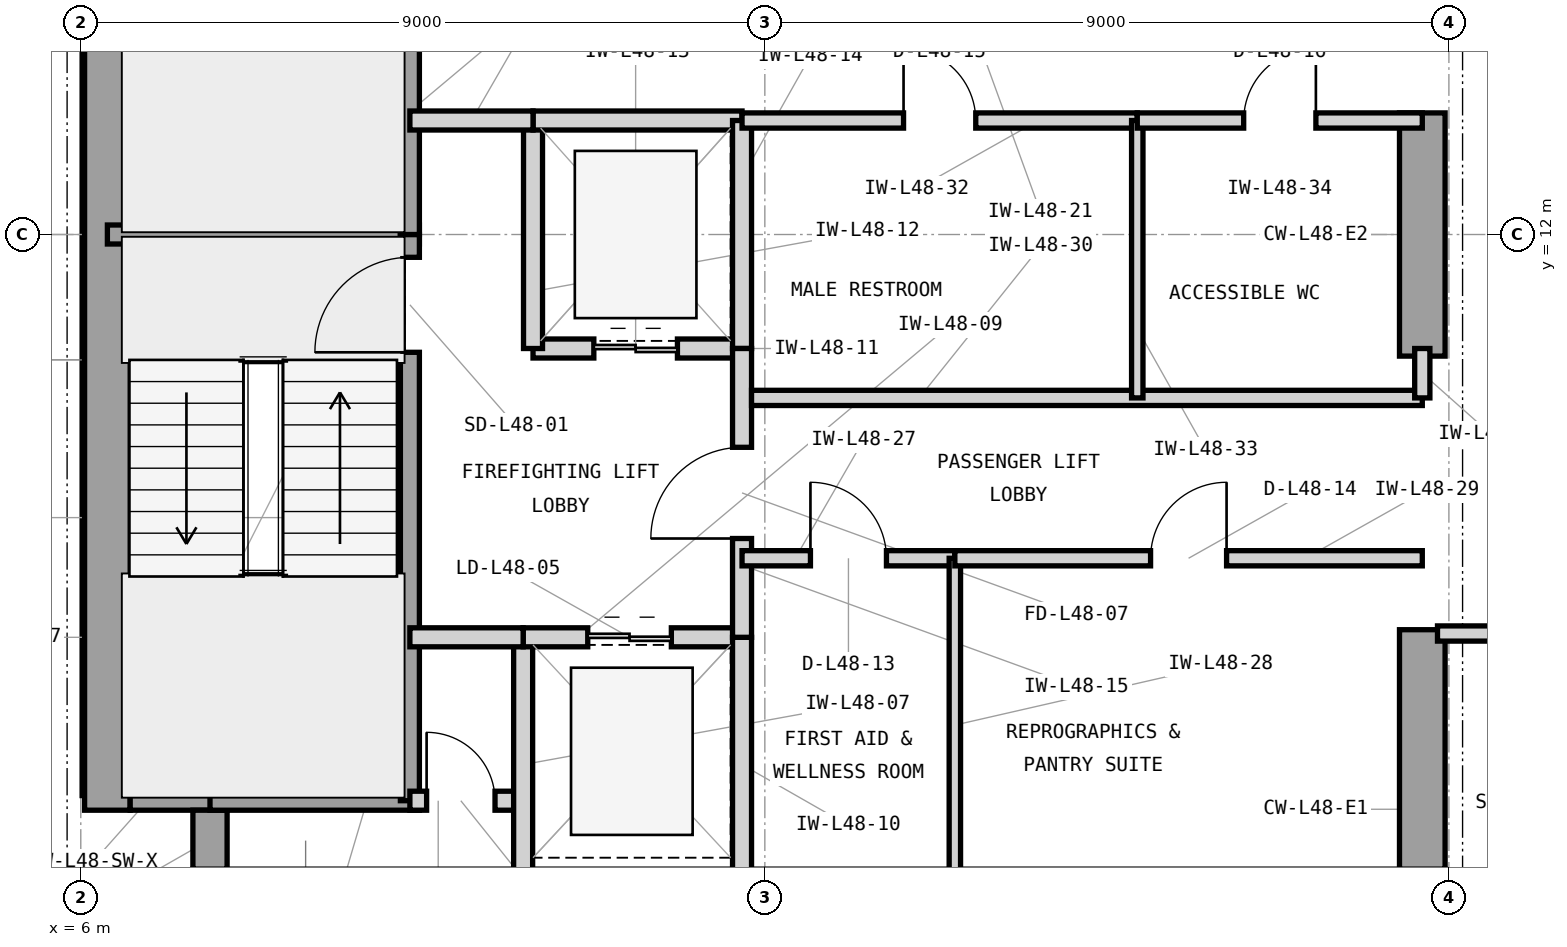
"""IFC4 building model, lengths in metres.
Left out: names, types, materials, properties, quantities, classifications, styles, units other than length and angle.
Written with IfcOpenShell. Run it as: python <this file> out.ifc"""

import sys

from ifc_helpers import new_model, si_unit, direction, frame, frame_2d, origin, place, context, subcontext, project, spatial, rectangle, extrude, element, fill, save


model = new_model("IFC4")
c1 = context("Model", 3, precision=1e-05, world=origin(), true_north=direction((0.0, 1.0)))
c2 = subcontext(c1, "Body", "Model", "MODEL_VIEW")
j1 = project(units=[si_unit("LENGTHUNIT", "METRE"), si_unit("PLANEANGLEUNIT", "RADIAN")], contexts=[c1])
p1 = place(None, origin())
s1 = spatial("IfcSite", under=j1, at=p1, CompositionType="ELEMENT")
p2 = place(p1, origin())
s2 = spatial("IfcBuilding", under=s1, at=p2, CompositionType="ELEMENT")
p3 = place(p2, frame((0.0, 0.0, 199.5)))
s3 = spatial("IfcBuildingStorey", under=s2, at=p3, CompositionType="ELEMENT", Elevation=199.5)
p4 = place(p3, frame((6.35, 4.425, 0.0), z_axis=(0.0, 0.0, 1.0), x_axis=(0.0, 1.0, 0.0)))
e1 = element("IfcWall", 1, at=p4, inside=s3, PredefinedType="SHEAR", context=c2, shape_type="SweptSolid", body=[
    extrude(rectangle(XDim=15.15, YDim=0.6, at=frame_2d((7.575, 0.0))), origin(), (0.0, 0.0, 1.0), 3.9),
])
p5 = place(p3, frame((23.65, 3.65, 0.0), z_axis=(0.0, 0.0, 1.0), x_axis=(0.0, 1.0, 0.0)))
e2 = element("IfcWall", 2, at=p5, inside=s3, PredefinedType="SHEAR", context=c2, shape_type="SweptSolid", body=[
    extrude(rectangle(XDim=3.15, YDim=0.6, at=frame_2d((1.575, 0.0))), origin(), (0.0, 0.0, 1.0), 3.9),
])
p6 = place(p3, frame((23.65, 10.4, 0.0), z_axis=(0.0, 0.0, 1.0), x_axis=(0.0, 1.0, 0.0)))
e3 = element("IfcWall", 3, at=p6, inside=s3, PredefinedType="SHEAR", context=c2, shape_type="SweptSolid", body=[
    extrude(rectangle(XDim=3.2, YDim=0.6, at=frame_2d((1.6, 0.0))), origin(), (0.0, 0.0, 1.0), 3.9),
])
p7 = place(p3, frame((6.65, 4.65, 0.0), z_axis=(0.0, 0.0, 1.0), x_axis=(1.0, 0.0, 0.0)))
e4 = element("IfcWall", 4, at=p7, inside=s3, PredefinedType="SHEAR", context=c2, shape_type="SweptSolid", body=[
    extrude(rectangle(XDim=1.275, YDim=0.45, at=frame_2d((0.638, 0.0))), origin(), (0.0, 0.0, 1.0), 3.9),
])
p8 = place(p3, frame((7.7, 3.65, 0.0), z_axis=(0.0, 0.0, 1.0), x_axis=(0.0, 1.0, 0.0)))
e5 = element("IfcWall", 5, at=p8, inside=s3, PredefinedType="SHEAR", context=c2, shape_type="SweptSolid", body=[
    extrude(rectangle(XDim=0.775, YDim=0.45, at=frame_2d((0.388, 0.0))), origin(), (0.0, 0.0, 1.0), 3.9),
])
p9 = place(p3, frame((6.35, 12.0, 0.0), z_axis=(0.0, 0.0, 1.0), x_axis=(1.0, 0.0, 0.0)))
e6 = element("IfcWall", 6, at=p9, inside=s3, PredefinedType="SHEAR", context=c2, shape_type="SweptSolid", body=[
    extrude(rectangle(XDim=4.105, YDim=0.25, at=frame_2d((2.052, 0.0))), origin(), (0.0, 0.0, 1.0), 3.9),
])
p10 = place(p3, frame((7.7, 4.55, 0.0), z_axis=(0.0, 0.0, 1.0), x_axis=(1.0, 0.0, 0.0)))
e7 = element("IfcWall", 7, at=p10, inside=s3, PredefinedType="SHEAR", context=c2, shape_type="SweptSolid", body=[
    extrude(rectangle(XDim=2.755, YDim=0.25, at=frame_2d((1.377, 0.0))), origin(), (0.0, 0.0, 1.0), 3.9),
])
p11 = place(p3, frame((10.33, 4.55, 0.0), z_axis=(0.0, 0.0, 1.0), x_axis=(0.0, 1.0, 0.0)))
e8 = element("IfcWall", 8, at=p11, inside=s3, PredefinedType="SHEAR", context=c2, shape_type="SweptSolid", body=[
    extrude(rectangle(XDim=7.45, YDim=0.25, at=frame_2d((3.725, 0.0))), origin(), (0.0, 0.0, 1.0), 3.9),
])
p12 = place(p11, frame((5.9, 0.0, 0.0)))
e9 = element("IfcOpeningElement", 9, at=p12, cuts=e8, PredefinedType="OPENING", context=c2, shape_type="SweptSolid", body=[
    extrude(rectangle(XDim=1.25, YDim=2.2, at=frame_2d((0.625, 1.1))), frame((0.0, 0.135, 0.0), z_axis=(0.0, -1.0, 0.0), x_axis=(1.0, 0.0, 0.0)), (0.0, 0.0, 1.0), 0.27),
])
p13 = place(p3, frame((10.33, 12.0, 0.0), z_axis=(0.0, 0.0, 1.0), x_axis=(0.0, 1.0, 0.0)))
e10 = element("IfcWall", 10, at=p13, inside=s3, PredefinedType="SHEAR", context=c2, shape_type="SweptSolid", body=[
    extrude(rectangle(XDim=7.45, YDim=0.25, at=frame_2d((3.725, 0.0))), origin(), (0.0, 0.0, 1.0), 3.9),
])
p14 = place(p13, frame((5.85, 0.0, 0.0)))
e11 = element("IfcOpeningElement", 11, at=p14, cuts=e10, PredefinedType="OPENING", context=c2, shape_type="SweptSolid", body=[
    extrude(rectangle(XDim=1.25, YDim=2.2, at=frame_2d((0.625, 1.1))), frame((0.0, 0.135, 0.0), z_axis=(0.0, -1.0, 0.0), x_axis=(1.0, 0.0, 0.0)), (0.0, 0.0, 1.0), 0.27),
])
p15 = place(p3, frame((10.33, 4.55, 0.0), z_axis=(0.0, 0.0, 1.0), x_axis=(1.0, 0.0, 0.0)))
e12 = element("IfcWall", 12, at=p15, inside=s3, PredefinedType="PARTITIONING", context=c2, shape_type="SweptSolid", body=[
    extrude(rectangle(XDim=1.49, YDim=0.25, at=frame_2d((0.745, 0.0))), origin(), (0.0, 0.0, 1.0), 3.69),
])
p16 = place(p15, frame((0.22, 0.0, 0.0)))
e13 = element("IfcOpeningElement", 13, at=p16, cuts=e12, PredefinedType="OPENING", context=c2, shape_type="SweptSolid", body=[
    extrude(rectangle(XDim=0.9, YDim=2.1, at=frame_2d((0.45, 1.05))), frame((0.0, 0.135, 0.0), z_axis=(0.0, -1.0, 0.0), x_axis=(1.0, 0.0, 0.0)), (0.0, 0.0, 1.0), 0.27),
])
p17 = place(p3, frame((11.82, 3.35, 0.0), z_axis=(0.0, 0.0, 1.0), x_axis=(0.0, 1.0, 0.0)))
e14 = element("IfcWall", 14, at=p17, inside=s3, PredefinedType="PARTITIONING", context=c2, shape_type="SweptSolid", body=[
    extrude(rectangle(XDim=3.35, YDim=0.25, at=frame_2d((1.675, 0.0))), origin(), (0.0, 0.0, 1.0), 3.69),
])
p18 = place(p3, frame((11.82, 6.7, 0.0), z_axis=(0.0, 0.0, 1.0), x_axis=(1.0, 0.0, 0.0)))
e15 = element("IfcWall", 15, at=p18, inside=s3, PredefinedType="PARTITIONING", context=c2, shape_type="SweptSolid", body=[
    extrude(rectangle(XDim=2.88, YDim=0.25, at=frame_2d((1.44, 0.0))), origin(), (0.0, 0.0, 1.0), 3.283),
])
p19 = place(p18, frame((0.85, 0.0, 0.0)))
e16 = element("IfcOpeningElement", 16, at=p19, cuts=e15, PredefinedType="OPENING", context=c2, shape_type="SweptSolid", body=[
    extrude(rectangle(XDim=1.1, YDim=2.25, at=frame_2d((0.55, 1.125))), frame((0.0, 0.135, 0.0), z_axis=(0.0, -1.0, 0.0), x_axis=(1.0, 0.0, 0.0)), (0.0, 0.0, 1.0), 0.27),
])
p20 = place(p3, frame((14.7, 3.35, 0.0), z_axis=(0.0, 0.0, 1.0), x_axis=(0.0, 1.0, 0.0)))
e17 = element("IfcWall", 17, at=p20, inside=s3, PredefinedType="PARTITIONING", context=c2, shape_type="SweptSolid", body=[
    extrude(rectangle(XDim=3.35, YDim=0.25, at=frame_2d((1.675, 0.0))), origin(), (0.0, 0.0, 1.0), 3.69),
])
p21 = place(p3, frame((11.95, 10.5, 0.0), z_axis=(0.0, 0.0, 1.0), x_axis=(1.0, 0.0, 0.0)))
e18 = element("IfcWall", 18, at=p21, inside=s3, PredefinedType="PARTITIONING", context=c2, shape_type="SweptSolid", body=[
    extrude(rectangle(XDim=2.75, YDim=0.25, at=frame_2d((1.375, 0.0))), origin(), (0.0, 0.0, 1.0), 3.283),
])
p22 = place(p21, frame((0.8, 0.0, 0.0)))
e19 = element("IfcOpeningElement", 19, at=p22, cuts=e18, PredefinedType="OPENING", context=c2, shape_type="SweptSolid", body=[
    extrude(rectangle(XDim=1.1, YDim=2.25, at=frame_2d((0.55, 1.125))), frame((0.0, 0.135, 0.0), z_axis=(0.0, -1.0, 0.0), x_axis=(1.0, 0.0, 0.0)), (0.0, 0.0, 1.0), 0.27),
])
p23 = place(p3, frame((11.95, 10.5, 0.0), z_axis=(0.0, 0.0, 1.0), x_axis=(0.0, 1.0, 0.0)))
e20 = element("IfcWall", 20, at=p23, inside=s3, PredefinedType="PARTITIONING", context=c2, shape_type="SweptSolid", body=[
    extrude(rectangle(XDim=3.0, YDim=0.25, at=frame_2d((1.5, 0.0))), origin(), (0.0, 0.0, 1.0), 3.69),
])
p24 = place(p3, frame((11.95, 13.5, 0.0), z_axis=(0.0, 0.0, 1.0), x_axis=(1.0, 0.0, 0.0)))
e21 = element("IfcWall", 21, at=p24, inside=s3, PredefinedType="PARTITIONING", context=c2, shape_type="SweptSolid", body=[
    extrude(rectangle(XDim=2.75, YDim=0.25, at=frame_2d((1.375, 0.0))), origin(), (0.0, 0.0, 1.0), 3.283),
])
p25 = place(p3, frame((14.7, 10.5, 0.0), z_axis=(0.0, 0.0, 1.0), x_axis=(0.0, 1.0, 0.0)))
e22 = element("IfcWall", 22, at=p25, inside=s3, PredefinedType="PARTITIONING", context=c2, shape_type="SweptSolid", body=[
    extrude(rectangle(XDim=3.0, YDim=0.25, at=frame_2d((1.5, 0.0))), origin(), (0.0, 0.0, 1.0), 3.69),
])
p26 = place(p3, frame((14.7, 6.7, 0.0), z_axis=(0.0, 0.0, 1.0), x_axis=(0.0, 1.0, 0.0)))
e23 = element("IfcWall", 23, at=p26, inside=s3, PredefinedType="PARTITIONING", context=c2, shape_type="SweptSolid", body=[
    extrude(rectangle(XDim=3.8, YDim=0.25, at=frame_2d((1.9, 0.0))), origin(), (0.0, 0.0, 1.0), 3.69),
])
p27 = place(p26, frame((1.3, 0.0, 0.0)))
e24 = element("IfcOpeningElement", 24, at=p27, cuts=e23, PredefinedType="OPENING", context=c2, shape_type="SweptSolid", body=[
    extrude(rectangle(XDim=1.2, YDim=2.2, at=frame_2d((0.6, 1.1))), frame((0.0, 0.135, 0.0), z_axis=(0.0, -1.0, 0.0), x_axis=(1.0, 0.0, 0.0)), (0.0, 0.0, 1.0), 0.27),
])
p28 = place(p3, frame((10.33, 13.5, 0.0), z_axis=(0.0, 0.0, 1.0), x_axis=(1.0, 0.0, 0.0)))
e25 = element("IfcWall", 25, at=p28, inside=s3, PredefinedType="PARTITIONING", context=c2, shape_type="SweptSolid", body=[
    extrude(rectangle(XDim=1.62, YDim=0.25, at=frame_2d((0.81, 0.0))), origin(), (0.0, 0.0, 1.0), 3.283),
])
p29 = place(p3, frame((10.33, 6.7, 0.0), z_axis=(0.0, 0.0, 1.0), x_axis=(1.0, 0.0, 0.0)))
e26 = element("IfcWall", 26, at=p29, inside=s3, PredefinedType="PARTITIONING", context=c2, shape_type="SweptSolid", body=[
    extrude(rectangle(XDim=1.49, YDim=0.25, at=frame_2d((0.745, 0.0))), origin(), (0.0, 0.0, 1.0), 3.283),
])
p30 = place(p3, frame((14.7, 7.74, 0.0), z_axis=(0.0, 0.0, 1.0), x_axis=(1.0, 0.0, 0.0)))
e27 = element("IfcWall", 27, at=p30, inside=s3, PredefinedType="PARTITIONING", context=c2, shape_type="SweptSolid", body=[
    extrude(rectangle(XDim=2.8, YDim=0.2, at=frame_2d((1.4, 0.0))), origin(), (0.0, 0.0, 1.0), 3.69),
])
p31 = place(p30, frame((0.9, 0.0, 0.0)))
e28 = element("IfcOpeningElement", 28, at=p31, cuts=e27, PredefinedType="OPENING", context=c2, shape_type="SweptSolid", body=[
    extrude(rectangle(XDim=1.0, YDim=2.15, at=frame_2d((0.5, 1.075))), frame((0.0, 0.11, 0.0), z_axis=(0.0, -1.0, 0.0), x_axis=(1.0, 0.0, 0.0)), (0.0, 0.0, 1.0), 0.22),
])
p32 = place(p3, frame((17.5, 3.35, 0.0), z_axis=(0.0, 0.0, 1.0), x_axis=(0.0, 1.0, 0.0)))
e29 = element("IfcWall", 29, at=p32, inside=s3, PredefinedType="PARTITIONING", context=c2, shape_type="SweptSolid", body=[
    extrude(rectangle(XDim=4.39, YDim=0.15, at=frame_2d((2.195, 0.0))), origin(), (0.0, 0.0, 1.0), 3.69),
])
p33 = place(p3, frame((17.5, 7.74, 0.0), z_axis=(0.0, 0.0, 1.0), x_axis=(1.0, 0.0, 0.0)))
e30 = element("IfcWall", 30, at=p33, inside=s3, PredefinedType="PARTITIONING", context=c2, shape_type="SweptSolid", body=[
    extrude(rectangle(XDim=6.15, YDim=0.2, at=frame_2d((3.075, 0.0))), origin(), (0.0, 0.0, 1.0), 3.69),
])
p34 = place(p33, frame((2.575, 0.0, 0.0)))
e31 = element("IfcOpeningElement", 31, at=p34, cuts=e30, PredefinedType="OPENING", context=c2, shape_type="SweptSolid", body=[
    extrude(rectangle(XDim=1.0, YDim=2.15, at=frame_2d((0.5, 1.075))), frame((0.0, 0.11, 0.0), z_axis=(0.0, -1.0, 0.0), x_axis=(1.0, 0.0, 0.0)), (0.0, 0.0, 1.0), 0.22),
])
p35 = place(p3, frame((14.825, 9.85, 0.0), z_axis=(0.0, 0.0, 1.0), x_axis=(1.0, 0.0, 0.0)))
e32 = element("IfcWall", 32, at=p35, inside=s3, PredefinedType="PARTITIONING", context=c2, shape_type="SweptSolid", body=[
    extrude(rectangle(XDim=8.825, YDim=0.2, at=frame_2d((4.413, 0.0))), origin(), (0.0, 0.0, 1.0), 3.69),
])
p36 = place(p3, frame((23.65, 9.85, 0.0), z_axis=(0.0, 0.0, 1.0), x_axis=(0.0, 1.0, 0.0)))
e33 = element("IfcWall", 33, at=p36, inside=s3, PredefinedType="PARTITIONING", context=c2, shape_type="SweptSolid", body=[
    extrude(rectangle(XDim=0.65, YDim=0.2, at=frame_2d((0.325, 0.0))), origin(), (0.0, 0.0, 1.0), 3.69),
])
p37 = place(p3, frame((14.7, 13.5, 0.0), z_axis=(0.0, 0.0, 1.0), x_axis=(1.0, 0.0, 0.0)))
e34 = element("IfcWall", 34, at=p37, inside=s3, PredefinedType="PARTITIONING", context=c2, shape_type="SweptSolid", body=[
    extrude(rectangle(XDim=5.2, YDim=0.2, at=frame_2d((2.6, 0.0))), origin(), (0.0, 0.0, 1.0), 3.283),
])
p38 = place(p37, frame((2.125, 0.0, 0.0)))
e35 = element("IfcOpeningElement", 35, at=p38, cuts=e34, PredefinedType="OPENING", context=c2, shape_type="SweptSolid", body=[
    extrude(rectangle(XDim=0.95, YDim=2.1, at=frame_2d((0.475, 1.05))), frame((0.0, 0.11, 0.0), z_axis=(0.0, -1.0, 0.0), x_axis=(1.0, 0.0, 0.0)), (0.0, 0.0, 1.0), 0.22),
])
p39 = place(p3, frame((19.9, 9.85, 0.0), z_axis=(0.0, 0.0, 1.0), x_axis=(0.0, 1.0, 0.0)))
e36 = element("IfcWall", 36, at=p39, inside=s3, PredefinedType="PARTITIONING", context=c2, shape_type="SweptSolid", body=[
    extrude(rectangle(XDim=3.65, YDim=0.15, at=frame_2d((1.825, 0.0))), origin(), (0.0, 0.0, 1.0), 3.69),
])
p40 = place(p3, frame((19.9, 13.5, 0.0), z_axis=(0.0, 0.0, 1.0), x_axis=(1.0, 0.0, 0.0)))
e37 = element("IfcWall", 37, at=p40, inside=s3, PredefinedType="PARTITIONING", context=c2, shape_type="SweptSolid", body=[
    extrude(rectangle(XDim=3.75, YDim=0.2, at=frame_2d((1.875, 0.0))), origin(), (0.0, 0.0, 1.0), 3.283),
])
p41 = place(p40, frame((1.4, 0.0, 0.0)))
e38 = element("IfcOpeningElement", 38, at=p41, cuts=e37, PredefinedType="OPENING", context=c2, shape_type="SweptSolid", body=[
    extrude(rectangle(XDim=0.95, YDim=2.1, at=frame_2d((0.475, 1.05))), frame((0.0, 0.11, 0.0), z_axis=(0.0, -1.0, 0.0), x_axis=(1.0, 0.0, 0.0)), (0.0, 0.0, 1.0), 0.22),
])
p42 = place(p3, frame((23.85, 6.75, 0.0), z_axis=(0.0, 0.0, 1.0), x_axis=(1.0, 0.0, 0.0)))
e39 = element("IfcWall", 39, at=p42, inside=s3, PredefinedType="PARTITIONING", context=c2, shape_type="SweptSolid", body=[
    extrude(rectangle(XDim=2.85, YDim=0.2, at=frame_2d((1.425, 0.0))), origin(), (0.0, 0.0, 1.0), 3.69),
])
p43 = place(p42, frame((0.7, 0.0, 0.0)))
e40 = element("IfcOpeningElement", 40, at=p43, cuts=e39, PredefinedType="OPENING", context=c2, shape_type="SweptSolid", body=[
    extrude(rectangle(XDim=1.0, YDim=2.15, at=frame_2d((0.5, 1.075))), frame((0.0, 0.11, 0.0), z_axis=(0.0, -1.0, 0.0), x_axis=(1.0, 0.0, 0.0)), (0.0, 0.0, 1.0), 0.22),
])
p44 = place(p12, origin())
e41 = element("IfcDoor", 41, at=p44, inside=s3, OperationType="SINGLE_SWING_LEFT", PredefinedType="DOOR", context=c2, shape_type="SweptSolid", body=[
    extrude(rectangle(XDim=1.25, YDim=2.2, at=frame_2d((0.625, 1.1))), frame((0.0, 0.025, 0.0), z_axis=(0.0, -1.0, 0.0), x_axis=(1.0, 0.0, 0.0)), (0.0, 0.0, 1.0), 0.05),
])
fill(e9, e41)
p45 = place(p16, origin())
e42 = element("IfcDoor", 42, at=p45, inside=s3, OperationType="SINGLE_SWING_LEFT", PredefinedType="TRAPDOOR", context=c2, shape_type="SweptSolid", body=[
    extrude(rectangle(XDim=0.9, YDim=2.1, at=frame_2d((0.45, 1.05))), frame((0.0, 0.025, 0.0), z_axis=(0.0, -1.0, 0.0), x_axis=(1.0, 0.0, 0.0)), (0.0, 0.0, 1.0), 0.05),
])
fill(e13, e42)
p46 = place(p19, origin())
e43 = element("IfcDoor", 43, at=p46, inside=s3, OperationType="DOUBLE_DOOR_SLIDING", PredefinedType="DOOR", context=c2, shape_type="SweptSolid", body=[
    extrude(rectangle(XDim=1.1, YDim=2.25, at=frame_2d((0.55, 1.125))), frame((0.0, 0.025, 0.0), z_axis=(0.0, -1.0, 0.0), x_axis=(1.0, 0.0, 0.0)), (0.0, 0.0, 1.0), 0.05),
])
fill(e16, e43)
p47 = place(p22, origin())
e44 = element("IfcDoor", 44, at=p47, inside=s3, OperationType="DOUBLE_DOOR_SLIDING", PredefinedType="DOOR", context=c2, shape_type="SweptSolid", body=[
    extrude(rectangle(XDim=1.1, YDim=2.25, at=frame_2d((0.55, 1.125))), frame((0.0, 0.025, 0.0), z_axis=(0.0, -1.0, 0.0), x_axis=(1.0, 0.0, 0.0)), (0.0, 0.0, 1.0), 0.05),
])
fill(e19, e44)
p48 = place(p27, origin())
e45 = element("IfcDoor", 45, at=p48, inside=s3, OperationType="SINGLE_SWING_LEFT", PredefinedType="DOOR", context=c2, shape_type="SweptSolid", body=[
    extrude(rectangle(XDim=1.2, YDim=2.2, at=frame_2d((0.6, 1.1))), frame((0.0, 0.025, 0.0), z_axis=(0.0, -1.0, 0.0), x_axis=(1.0, 0.0, 0.0)), (0.0, 0.0, 1.0), 0.05),
])
fill(e24, e45)
p49 = place(p31, origin())
e46 = element("IfcDoor", 46, at=p49, inside=s3, OperationType="SINGLE_SWING_LEFT", PredefinedType="DOOR", context=c2, shape_type="SweptSolid", body=[
    extrude(rectangle(XDim=1.0, YDim=2.15, at=frame_2d((0.5, 1.075))), frame((0.0, 0.025, 0.0), z_axis=(0.0, -1.0, 0.0), x_axis=(1.0, 0.0, 0.0)), (0.0, 0.0, 1.0), 0.05),
])
fill(e28, e46)
p50 = place(p34, origin())
e47 = element("IfcDoor", 47, at=p50, inside=s3, OperationType="SINGLE_SWING_RIGHT", PredefinedType="DOOR", context=c2, shape_type="SweptSolid", body=[
    extrude(rectangle(XDim=1.0, YDim=2.15, at=frame_2d((0.5, 1.075))), frame((0.0, 0.025, 0.0), z_axis=(0.0, -1.0, 0.0), x_axis=(1.0, 0.0, 0.0)), (0.0, 0.0, 1.0), 0.05),
])
fill(e31, e47)
p51 = place(p38, origin())
e48 = element("IfcDoor", 48, at=p51, inside=s3, OperationType="SINGLE_SWING_LEFT", PredefinedType="DOOR", context=c2, shape_type="SweptSolid", body=[
    extrude(rectangle(XDim=0.95, YDim=2.1, at=frame_2d((0.475, 1.05))), frame((0.0, 0.025, 0.0), z_axis=(0.0, -1.0, 0.0), x_axis=(1.0, 0.0, 0.0)), (0.0, 0.0, 1.0), 0.05),
])
fill(e35, e48)
p52 = place(p41, origin())
e49 = element("IfcDoor", 49, at=p52, inside=s3, OperationType="SINGLE_SWING_RIGHT", PredefinedType="DOOR", context=c2, shape_type="SweptSolid", body=[
    extrude(rectangle(XDim=0.95, YDim=2.1, at=frame_2d((0.475, 1.05))), frame((0.0, 0.025, 0.0), z_axis=(0.0, -1.0, 0.0), x_axis=(1.0, 0.0, 0.0)), (0.0, 0.0, 1.0), 0.05),
])
fill(e38, e49)
save(model, sys.argv[1])
